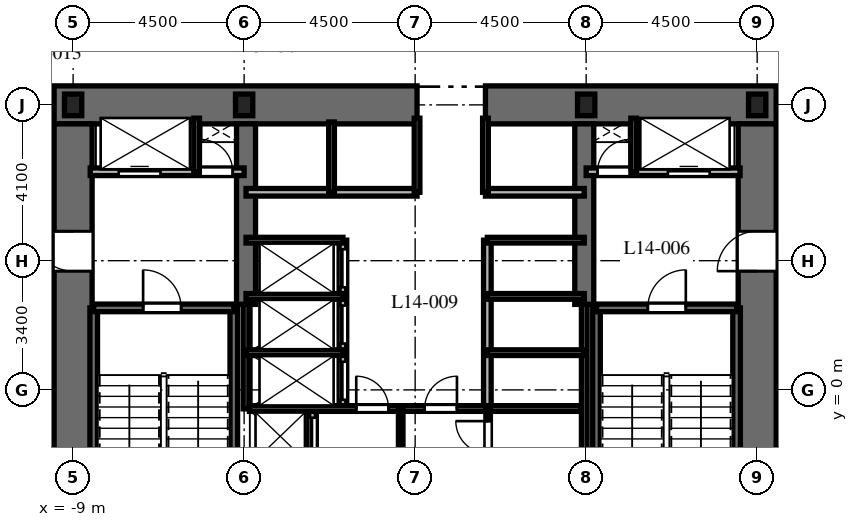
"""IFC4 building model, lengths in metres.
Left out: names, types, materials, properties, quantities, classifications, styles, units other than length and angle.
Written with IfcOpenShell. Run it as: python <this file> out.ifc"""

import sys

from ifc_helpers import new_model, si_unit, direction, frame, frame_2d, origin, origin_2d, place, context, subcontext, project, spatial, rectangle, i_section, extrude, element, fill, save


model = new_model("IFC4")
c1 = context("Model", 3, precision=1e-05, world=origin(), true_north=direction((0.0, 1.0)))
c2 = subcontext(c1, "Body", "Model", "MODEL_VIEW")
j1 = project(units=[si_unit("LENGTHUNIT", "METRE"), si_unit("PLANEANGLEUNIT", "RADIAN")], contexts=[c1])
p1 = place(None, origin())
s1 = spatial("IfcSite", under=j1, at=p1, CompositionType="ELEMENT")
p2 = place(p1, origin())
s2 = spatial("IfcBuilding", under=s1, at=p2, CompositionType="ELEMENT")
p3 = place(p2, frame((0.0, 0.0, 63.8)))
s3 = spatial("IfcBuildingStorey", under=s2, at=p3, CompositionType="ELEMENT", Elevation=63.8)
p4 = place(p3, frame((-9.5, 7.5, 0.0), z_axis=(0.0, 0.0, 1.0), x_axis=(1.0, 0.0, 0.0)))
e1 = element("IfcWall", 1, at=p4, inside=s3, PredefinedType="SHEAR", context=c2, shape_type="SweptSolid", body=[
    extrude(rectangle(XDim=9.55, YDim=1.0, at=frame_2d((4.775, 0.0))), origin(), (0.0, 0.0, 1.0), 3.7),
])
p5 = place(p3, frame((1.85, 7.5, 0.0), z_axis=(0.0, 0.0, 1.0), x_axis=(1.0, 0.0, 0.0)))
e2 = element("IfcWall", 2, at=p5, inside=s3, PredefinedType="SHEAR", context=c2, shape_type="SweptSolid", body=[
    extrude(rectangle(XDim=7.65, YDim=1.0, at=frame_2d((3.825, 0.0))), origin(), (0.0, 0.0, 1.0), 3.7),
])
p6 = place(p3, frame((-9.0, -7.0, 0.0), z_axis=(0.0, 0.0, 1.0), x_axis=(0.0, 1.0, 0.0)))
e3 = element("IfcWall", 3, at=p6, inside=s3, PredefinedType="SHEAR", context=c2, shape_type="SweptSolid", body=[
    extrude(rectangle(XDim=14.0, YDim=1.0, at=frame_2d((7.0, 0.0))), origin(), (0.0, 0.0, 1.0), 3.7),
])
p7 = place(p6, frame((10.125, 0.0, 0.0)))
e4 = element("IfcOpeningElement", 4, at=p7, cuts=e3, PredefinedType="OPENING", context=c2, shape_type="SweptSolid", body=[
    extrude(rectangle(XDim=1.05, YDim=2.15, at=frame_2d((0.525, 1.075))), frame((0.0, 0.51, 0.0), z_axis=(0.0, -1.0, 0.0), x_axis=(1.0, 0.0, 0.0)), (0.0, 0.0, 1.0), 1.02),
])
p8 = place(p3, frame((9.0, -7.0, 0.0), z_axis=(0.0, 0.0, 1.0), x_axis=(0.0, 1.0, 0.0)))
e5 = element("IfcWall", 5, at=p8, inside=s3, PredefinedType="SHEAR", context=c2, shape_type="SweptSolid", body=[
    extrude(rectangle(XDim=14.0, YDim=1.0, at=frame_2d((7.0, 0.0))), origin(), (0.0, 0.0, 1.0), 3.7),
])
p9 = place(p8, frame((10.125, 0.0, 0.0)))
e6 = element("IfcOpeningElement", 6, at=p9, cuts=e5, PredefinedType="OPENING", context=c2, shape_type="SweptSolid", body=[
    extrude(rectangle(XDim=1.05, YDim=2.15, at=frame_2d((0.525, 1.075))), frame((0.0, 0.51, 0.0), z_axis=(0.0, -1.0, 0.0), x_axis=(1.0, 0.0, 0.0)), (0.0, 0.0, 1.0), 1.02),
])
for number, where, z_axis, x_axis in (
    (7, (-4.45, 2.25, 0.0), (0.0, 0.0, 1.0), (0.0, 1.0, 0.0)),
    (8, (4.45, 2.25, 0.0), (0.0, 0.0, 1.0), (0.0, 1.0, 0.0)),
):
    element("IfcWall", number, at=place(p3, frame(where, z_axis=z_axis, x_axis=x_axis)), inside=s3, PredefinedType="SHEAR", context=c2, shape_type="SweptSolid", body=[
        extrude(rectangle(XDim=4.75, YDim=0.5, at=frame_2d((2.375, 0.0))), origin(), (0.0, 0.0, 1.0), 3.7),
    ])
for number, where, z_axis, x_axis in (
    (9, (-8.458, -6.985, 0.0), (0.0, 0.0, 1.0), (0.0, 1.0, 0.0)),
    (10, (-4.772, -6.985, 0.0), (0.0, 0.0, 1.0), (0.0, 1.0, 0.0)),
):
    element("IfcWall", number, at=place(p3, frame(where, z_axis=z_axis, x_axis=x_axis)), inside=s3, PredefinedType="SHEAR", context=c2, shape_type="SweptSolid", body=[
        extrude(rectangle(XDim=9.143, YDim=0.2, at=frame_2d((4.572, 0.0))), origin(), (0.0, 0.0, 1.0), 3.7),
    ])
p10 = place(p3, frame((-8.458, 2.158, 0.0), z_axis=(0.0, 0.0, 1.0), x_axis=(1.0, 0.0, 0.0)))
e11 = element("IfcWall", 11, at=p10, inside=s3, PredefinedType="SHEAR", context=c2, shape_type="SweptSolid", body=[
    extrude(rectangle(XDim=3.686, YDim=0.2, at=frame_2d((1.843, 0.0))), origin(), (0.0, 0.0, 1.0), 3.7),
])
p11 = place(p10, frame((1.3, 0.0, 0.0)))
e12 = element("IfcOpeningElement", 12, at=p11, cuts=e11, PredefinedType="OPENING", context=c2, shape_type="SweptSolid", body=[
    extrude(rectangle(XDim=1.0, YDim=2.15, at=frame_2d((0.5, 1.075))), frame((0.0, 0.11, 0.0), z_axis=(0.0, -1.0, 0.0), x_axis=(1.0, 0.0, 0.0)), (0.0, 0.0, 1.0), 0.22),
])
for number, where, z_axis, x_axis in (
    (13, (4.772, -6.985, 0.0), (0.0, 0.0, 1.0), (0.0, 1.0, 0.0)),
    (14, (8.458, -6.985, 0.0), (0.0, 0.0, 1.0), (0.0, 1.0, 0.0)),
):
    element("IfcWall", number, at=place(p3, frame(where, z_axis=z_axis, x_axis=x_axis)), inside=s3, PredefinedType="SHEAR", context=c2, shape_type="SweptSolid", body=[
        extrude(rectangle(XDim=9.143, YDim=0.2, at=frame_2d((4.572, 0.0))), origin(), (0.0, 0.0, 1.0), 3.7),
    ])
p12 = place(p3, frame((4.772, 2.158, 0.0), z_axis=(0.0, 0.0, 1.0), x_axis=(1.0, 0.0, 0.0)))
e15 = element("IfcWall", 15, at=p12, inside=s3, PredefinedType="SHEAR", context=c2, shape_type="SweptSolid", body=[
    extrude(rectangle(XDim=3.686, YDim=0.2, at=frame_2d((1.843, 0.0))), origin(), (0.0, 0.0, 1.0), 3.7),
])
p13 = place(p12, frame((1.35, 0.0, 0.0)))
e16 = element("IfcOpeningElement", 16, at=p13, cuts=e15, PredefinedType="OPENING", context=c2, shape_type="SweptSolid", body=[
    extrude(rectangle(XDim=1.0, YDim=2.15, at=frame_2d((0.5, 1.075))), frame((0.0, 0.11, 0.0), z_axis=(0.0, -1.0, 0.0), x_axis=(1.0, 0.0, 0.0)), (0.0, 0.0, 1.0), 0.22),
])
for number, where, z_axis, x_axis in (
    (17, (9.0, 7.5, 0.0), (0.0, 0.0, 1.0), (1.0, 0.0, 0.0)),
    (18, (4.5, 7.5, 0.0), (0.0, 0.0, 1.0), (1.0, 0.0, 0.0)),
    (19, (-4.5, 7.5, 0.0), (0.0, 0.0, 1.0), (1.0, 0.0, 0.0)),
    (20, (-9.0, 7.5, 0.0), (0.0, 0.0, 1.0), (1.0, 0.0, 0.0)),
):
    element("IfcColumn", number, at=place(p3, frame(where, z_axis=z_axis, x_axis=x_axis)), inside=s3, PredefinedType="COLUMN", context=c2, shape_type="SweptSolid", body=[
        extrude(i_section(OverallWidth=0.454, OverallDepth=0.569, WebThickness=0.078, FlangeThickness=0.125, at=origin_2d()), origin(), (0.0, 0.0, 1.0), 3.7),
    ])
p14 = place(p3, frame((-8.55, 5.74, 0.0), z_axis=(0.0, 0.0, 1.0), x_axis=(1.0, 0.0, 0.0)))
e21 = element("IfcWall", 21, at=p14, inside=s3, PredefinedType="PARTITIONING", context=c2, shape_type="SweptSolid", body=[
    extrude(rectangle(XDim=4.05, YDim=0.2, at=frame_2d((2.025, 0.0))), origin(), (0.0, 0.0, 1.0), 3.4),
])
p15 = place(p14, frame((0.75, 0.0, 0.0)))
e22 = element("IfcOpeningElement", 22, at=p15, cuts=e21, PredefinedType="OPENING", context=c2, shape_type="SweptSolid", body=[
    extrude(rectangle(XDim=1.1, YDim=2.2, at=frame_2d((0.55, 1.1))), frame((0.0, 0.11, 0.0), z_axis=(0.0, -1.0, 0.0), x_axis=(1.0, 0.0, 0.0)), (0.0, 0.0, 1.0), 0.22),
])
p16 = place(p14, frame((2.9, 0.0, 0.0)))
e23 = element("IfcOpeningElement", 23, at=p16, cuts=e21, PredefinedType="OPENING", context=c2, shape_type="SweptSolid", body=[
    extrude(rectangle(XDim=0.85, YDim=2.03, at=frame_2d((0.425, 1.015))), frame((0.0, 0.11, 0.0), z_axis=(0.0, -1.0, 0.0), x_axis=(1.0, 0.0, 0.0)), (0.0, 0.0, 1.0), 0.22),
])
p17 = place(p3, frame((-5.75, 5.74, 0.0), z_axis=(0.0, 0.0, 1.0), x_axis=(0.0, 1.0, 0.0)))
e24 = element("IfcWall", 24, at=p17, inside=s3, PredefinedType="PARTITIONING", context=c2, shape_type="SweptSolid", body=[
    extrude(rectangle(XDim=1.41, YDim=0.15, at=frame_2d((0.705, 0.0))), origin(), (0.0, 0.0, 1.0), 3.4),
])
p18 = place(p3, frame((4.5, 5.74, 0.0), z_axis=(0.0, 0.0, 1.0), x_axis=(1.0, 0.0, 0.0)))
e25 = element("IfcWall", 25, at=p18, inside=s3, PredefinedType="PARTITIONING", context=c2, shape_type="SweptSolid", body=[
    extrude(rectangle(XDim=4.05, YDim=0.2, at=frame_2d((2.025, 0.0))), origin(), (0.0, 0.0, 1.0), 3.4),
])
p19 = place(p18, frame((0.3, 0.0, 0.0)))
e26 = element("IfcOpeningElement", 26, at=p19, cuts=e25, PredefinedType="OPENING", context=c2, shape_type="SweptSolid", body=[
    extrude(rectangle(XDim=0.85, YDim=2.03, at=frame_2d((0.425, 1.015))), frame((0.0, 0.11, 0.0), z_axis=(0.0, -1.0, 0.0), x_axis=(1.0, 0.0, 0.0)), (0.0, 0.0, 1.0), 0.22),
])
p20 = place(p18, frame((2.15, 0.0, 0.0)))
e27 = element("IfcOpeningElement", 27, at=p20, cuts=e25, PredefinedType="OPENING", context=c2, shape_type="SweptSolid", body=[
    extrude(rectangle(XDim=1.1, YDim=2.2, at=frame_2d((0.55, 1.1))), frame((0.0, 0.11, 0.0), z_axis=(0.0, -1.0, 0.0), x_axis=(1.0, 0.0, 0.0)), (0.0, 0.0, 1.0), 0.22),
])
p21 = place(p3, frame((5.75, 5.74, 0.0), z_axis=(0.0, 0.0, 1.0), x_axis=(0.0, 1.0, 0.0)))
e28 = element("IfcWall", 28, at=p21, inside=s3, PredefinedType="PARTITIONING", context=c2, shape_type="SweptSolid", body=[
    extrude(rectangle(XDim=1.41, YDim=0.15, at=frame_2d((0.705, 0.0))), origin(), (0.0, 0.0, 1.0), 3.4),
])
p22 = place(p3, frame((-2.7, -1.972, 0.0), z_axis=(0.0, 0.0, 1.0), x_axis=(0.0, 1.0, 0.0)))
e29 = element("IfcWall", 29, at=p22, inside=s3, PredefinedType="PARTITIONING", context=c2, shape_type="SweptSolid", body=[
    extrude(rectangle(XDim=1.472, YDim=0.2, at=frame_2d((0.736, 0.0))), origin(), (0.0, 0.0, 1.0), 3.4),
])
p23 = place(p22, frame((0.24, 0.0, 0.0)))
e30 = element("IfcOpeningElement", 30, at=p23, cuts=e29, PredefinedType="OPENING", context=c2, shape_type="SweptSolid", body=[
    extrude(rectangle(XDim=1.0, YDim=2.2, at=frame_2d((0.5, 1.1))), frame((0.0, 0.11, 0.0), z_axis=(0.0, -1.0, 0.0), x_axis=(1.0, 0.0, 0.0)), (0.0, 0.0, 1.0), 0.22),
])
p24 = place(p3, frame((-4.45, 5.2, 0.0), z_axis=(0.0, 0.0, 1.0), x_axis=(1.0, 0.0, 0.0)))
e31 = element("IfcWall", 31, at=p24, inside=s3, PredefinedType="PARTITIONING", context=c2, shape_type="SweptSolid", body=[
    extrude(rectangle(XDim=4.5, YDim=0.2, at=frame_2d((2.25, 0.0))), origin(), (0.0, 0.0, 1.0), 3.4),
])
p25 = place(p3, frame((1.85, 5.2, 0.0), z_axis=(0.0, 0.0, 1.0), x_axis=(1.0, 0.0, 0.0)))
e32 = element("IfcWall", 32, at=p25, inside=s3, PredefinedType="PARTITIONING", context=c2, shape_type="SweptSolid", body=[
    extrude(rectangle(XDim=2.6, YDim=0.2, at=frame_2d((1.3, 0.0))), origin(), (0.0, 0.0, 1.0), 3.4),
])
p26 = place(p3, frame((-2.2, 5.2, 0.0), z_axis=(0.0, 0.0, 1.0), x_axis=(0.0, 1.0, 0.0)))
e33 = element("IfcWall", 33, at=p26, inside=s3, PredefinedType="PARTITIONING", context=c2, shape_type="SweptSolid", body=[
    extrude(rectangle(XDim=1.85, YDim=0.15, at=frame_2d((0.925, 0.0))), origin(), (0.0, 0.0, 1.0), 3.4),
])
for number, where, z_axis, x_axis in (
    (34, (0.05, 5.2, 0.0), (0.0, 0.0, 1.0), (0.0, 1.0, 0.0)),
    (35, (1.85, 5.2, 0.0), (0.0, 0.0, 1.0), (0.0, 1.0, 0.0)),
):
    element("IfcWall", number, at=place(p3, frame(where, z_axis=z_axis, x_axis=x_axis)), inside=s3, PredefinedType="PARTITIONING", context=c2, shape_type="SweptSolid", body=[
        extrude(rectangle(XDim=1.95, YDim=0.15, at=frame_2d((0.975, 0.0))), origin(), (0.0, 0.0, 1.0), 3.4),
    ])
p27 = place(p3, frame((-4.45, -0.5, 0.0), z_axis=(0.0, 0.0, 1.0), x_axis=(0.0, 1.0, 0.0)))
e36 = element("IfcWall", 36, at=p27, inside=s3, PredefinedType="PARTITIONING", context=c2, shape_type="SweptSolid", body=[
    extrude(rectangle(XDim=2.75, YDim=0.15, at=frame_2d((1.375, 0.0))), origin(), (0.0, 0.0, 1.0), 3.4),
])
p28 = place(p3, frame((4.45, -1.972, 0.0), z_axis=(0.0, 0.0, 1.0), x_axis=(0.0, 1.0, 0.0)))
e37 = element("IfcWall", 37, at=p28, inside=s3, PredefinedType="PARTITIONING", context=c2, shape_type="SweptSolid", body=[
    extrude(rectangle(XDim=4.222, YDim=0.15, at=frame_2d((2.111, 0.0))), origin(), (0.0, 0.0, 1.0), 3.4),
])
p29 = place(p3, frame((-1.9, -0.5, 0.0), z_axis=(0.0, 0.0, 1.0), x_axis=(0.0, 1.0, 0.0)))
e38 = element("IfcWall", 38, at=p29, inside=s3, PredefinedType="PARTITIONING", context=c2, shape_type="SweptSolid", body=[
    extrude(rectangle(XDim=4.44, YDim=0.2, at=frame_2d((2.22, 0.0))), origin(), (0.0, 0.0, 1.0), 3.4),
])
p30 = place(p29, frame((0.24, 0.0, 0.0)))
e39 = element("IfcOpeningElement", 39, at=p30, cuts=e38, PredefinedType="OPENING", context=c2, shape_type="SweptSolid", body=[
    extrude(rectangle(XDim=1.0, YDim=2.2, at=frame_2d((0.5, 1.1))), frame((0.0, 0.11, 0.0), z_axis=(0.0, -1.0, 0.0), x_axis=(1.0, 0.0, 0.0)), (0.0, 0.0, 1.0), 0.22),
])
p31 = place(p29, frame((1.72, 0.0, 0.0)))
e40 = element("IfcOpeningElement", 40, at=p31, cuts=e38, PredefinedType="OPENING", context=c2, shape_type="SweptSolid", body=[
    extrude(rectangle(XDim=1.0, YDim=2.2, at=frame_2d((0.5, 1.1))), frame((0.0, 0.11, 0.0), z_axis=(0.0, -1.0, 0.0), x_axis=(1.0, 0.0, 0.0)), (0.0, 0.0, 1.0), 0.22),
])
p32 = place(p29, frame((3.2, 0.0, 0.0)))
e41 = element("IfcOpeningElement", 41, at=p32, cuts=e38, PredefinedType="OPENING", context=c2, shape_type="SweptSolid", body=[
    extrude(rectangle(XDim=1.0, YDim=2.2, at=frame_2d((0.5, 1.1))), frame((0.0, 0.11, 0.0), z_axis=(0.0, -1.0, 0.0), x_axis=(1.0, 0.0, 0.0)), (0.0, 0.0, 1.0), 0.22),
])
for number, where, z_axis, x_axis in (
    (42, (-4.45, 3.94, 0.0), (0.0, 0.0, 1.0), (1.0, 0.0, 0.0)),
    (43, (-4.45, 0.98, 0.0), (0.0, 0.0, 1.0), (1.0, 0.0, 0.0)),
    (44, (-4.45, 2.46, 0.0), (0.0, 0.0, 1.0), (1.0, 0.0, 0.0)),
):
    element("IfcWall", number, at=place(p3, frame(where, z_axis=z_axis, x_axis=x_axis)), inside=s3, PredefinedType="PARTITIONING", context=c2, shape_type="SweptSolid", body=[
        extrude(rectangle(XDim=2.55, YDim=0.15, at=frame_2d((1.275, 0.0))), origin(), (0.0, 0.0, 1.0), 3.4),
    ])
p33 = place(p3, frame((1.9, -0.5, 0.0), z_axis=(0.0, 0.0, 1.0), x_axis=(0.0, 1.0, 0.0)))
e45 = element("IfcWall", 45, at=p33, inside=s3, PredefinedType="PARTITIONING", context=c2, shape_type="SweptSolid", body=[
    extrude(rectangle(XDim=4.44, YDim=0.2, at=frame_2d((2.22, 0.0))), origin(), (0.0, 0.0, 1.0), 3.4),
])
for number, where, z_axis, x_axis in (
    (46, (1.9, 3.94, 0.0), (0.0, 0.0, 1.0), (1.0, 0.0, 0.0)),
    (47, (1.9, 0.98, 0.0), (0.0, 0.0, 1.0), (1.0, 0.0, 0.0)),
    (48, (1.9, 2.46, 0.0), (0.0, 0.0, 1.0), (1.0, 0.0, 0.0)),
):
    element("IfcWall", number, at=place(p3, frame(where, z_axis=z_axis, x_axis=x_axis)), inside=s3, PredefinedType="PARTITIONING", context=c2, shape_type="SweptSolid", body=[
        extrude(rectangle(XDim=2.55, YDim=0.15, at=frame_2d((1.275, 0.0))), origin(), (0.0, 0.0, 1.0), 3.4),
    ])
p34 = place(p3, frame((-4.36, -0.49, 0.0), z_axis=(0.0, 0.0, 1.0), x_axis=(1.0, 0.0, 0.0)))
e49 = element("IfcWall", 49, at=p34, inside=s3, PredefinedType="PARTITIONING", context=c2, shape_type="SweptSolid", body=[
    extrude(rectangle(XDim=8.72, YDim=0.15, at=frame_2d((4.36, 0.0))), origin(), (0.0, 0.0, 1.0), 3.4),
])
p35 = place(p34, frame((2.81, 0.0, 0.0)))
e50 = element("IfcOpeningElement", 50, at=p35, cuts=e49, PredefinedType="OPENING", context=c2, shape_type="SweptSolid", body=[
    extrude(rectangle(XDim=0.85, YDim=2.03, at=frame_2d((0.425, 1.015))), frame((0.0, 0.085, 0.0), z_axis=(0.0, -1.0, 0.0), x_axis=(1.0, 0.0, 0.0)), (0.0, 0.0, 1.0), 0.17),
])
p36 = place(p34, frame((4.61, 0.0, 0.0)))
e51 = element("IfcOpeningElement", 51, at=p36, cuts=e49, PredefinedType="OPENING", context=c2, shape_type="SweptSolid", body=[
    extrude(rectangle(XDim=0.85, YDim=2.03, at=frame_2d((0.425, 1.015))), frame((0.0, 0.085, 0.0), z_axis=(0.0, -1.0, 0.0), x_axis=(1.0, 0.0, 0.0)), (0.0, 0.0, 1.0), 0.17),
])
p37 = place(p3, frame((-0.38, -1.972, 0.0), z_axis=(0.0, 0.0, 1.0), x_axis=(0.0, 1.0, 0.0)))
e52 = element("IfcWall", 52, at=p37, inside=s3, PredefinedType="PARTITIONING", context=c2, shape_type="SweptSolid", body=[
    extrude(rectangle(XDim=1.472, YDim=0.12, at=frame_2d((0.736, 0.0))), origin(), (0.0, 0.0, 1.0), 3.4),
])
p38 = place(p3, frame((1.92, -1.972, 0.0), z_axis=(0.0, 0.0, 1.0), x_axis=(0.0, 1.0, 0.0)))
e53 = element("IfcWall", 53, at=p38, inside=s3, PredefinedType="PARTITIONING", context=c2, shape_type="SweptSolid", body=[
    extrude(rectangle(XDim=1.472, YDim=0.12, at=frame_2d((0.736, 0.0))), origin(), (0.0, 0.0, 1.0), 3.4),
])
p39 = place(p38, frame((0.3, 0.0, 0.0)))
e54 = element("IfcOpeningElement", 54, at=p39, cuts=e53, PredefinedType="OPENING", context=c2, shape_type="SweptSolid", body=[
    extrude(rectangle(XDim=0.85, YDim=2.03, at=frame_2d((0.425, 1.015))), frame((0.0, 0.07, 0.0), z_axis=(0.0, -1.0, 0.0), x_axis=(1.0, 0.0, 0.0)), (0.0, 0.0, 1.0), 0.14),
])
p40 = place(p11, origin())
e55 = element("IfcDoor", 55, at=p40, inside=s3, OperationType="SINGLE_SWING_LEFT", PredefinedType="DOOR", context=c2, shape_type="SweptSolid", body=[
    extrude(rectangle(XDim=1.0, YDim=2.15, at=frame_2d((0.5, 1.075))), frame((0.0, 0.025, 0.0), z_axis=(0.0, -1.0, 0.0), x_axis=(1.0, 0.0, 0.0)), (0.0, 0.0, 1.0), 0.05),
])
fill(e12, e55)
p41 = place(p13, origin())
e56 = element("IfcDoor", 56, at=p41, inside=s3, OperationType="SINGLE_SWING_RIGHT", PredefinedType="DOOR", context=c2, shape_type="SweptSolid", body=[
    extrude(rectangle(XDim=1.0, YDim=2.15, at=frame_2d((0.5, 1.075))), frame((0.0, 0.025, 0.0), z_axis=(0.0, -1.0, 0.0), x_axis=(1.0, 0.0, 0.0)), (0.0, 0.0, 1.0), 0.05),
])
fill(e16, e56)
p42 = place(p7, origin())
e57 = element("IfcDoor", 57, at=p42, inside=s3, OperationType="SINGLE_SWING_RIGHT", PredefinedType="DOOR", context=c2, shape_type="SweptSolid", body=[
    extrude(rectangle(XDim=1.05, YDim=2.15, at=frame_2d((0.525, 1.075))), frame((0.0, 0.025, 0.0), z_axis=(0.0, -1.0, 0.0), x_axis=(1.0, 0.0, 0.0)), (0.0, 0.0, 1.0), 0.05),
])
fill(e4, e57)
p43 = place(p9, origin())
e58 = element("IfcDoor", 58, at=p43, inside=s3, OperationType="SINGLE_SWING_LEFT", PredefinedType="DOOR", context=c2, shape_type="SweptSolid", body=[
    extrude(rectangle(XDim=1.05, YDim=2.15, at=frame_2d((0.525, 1.075))), frame((0.0, 0.025, 0.0), z_axis=(0.0, -1.0, 0.0), x_axis=(1.0, 0.0, 0.0)), (0.0, 0.0, 1.0), 0.05),
])
fill(e6, e58)
p44 = place(p15, origin())
e59 = element("IfcDoor", 59, at=p44, inside=s3, OperationType="SLIDING_TO_LEFT", PredefinedType="DOOR", context=c2, shape_type="SweptSolid", body=[
    extrude(rectangle(XDim=1.1, YDim=2.2, at=frame_2d((0.55, 1.1))), frame((0.0, 0.025, 0.0), z_axis=(0.0, -1.0, 0.0), x_axis=(1.0, 0.0, 0.0)), (0.0, 0.0, 1.0), 0.05),
])
fill(e22, e59)
p45 = place(p16, origin())
e60 = element("IfcDoor", 60, at=p45, inside=s3, OperationType="SINGLE_SWING_LEFT", PredefinedType="DOOR", context=c2, shape_type="SweptSolid", body=[
    extrude(rectangle(XDim=0.85, YDim=2.03, at=frame_2d((0.425, 1.015))), frame((0.0, 0.025, 0.0), z_axis=(0.0, -1.0, 0.0), x_axis=(1.0, 0.0, 0.0)), (0.0, 0.0, 1.0), 0.05),
])
fill(e23, e60)
p46 = place(p19, origin())
e61 = element("IfcDoor", 61, at=p46, inside=s3, OperationType="SINGLE_SWING_RIGHT", PredefinedType="DOOR", context=c2, shape_type="SweptSolid", body=[
    extrude(rectangle(XDim=0.85, YDim=2.03, at=frame_2d((0.425, 1.015))), frame((0.0, 0.025, 0.0), z_axis=(0.0, -1.0, 0.0), x_axis=(1.0, 0.0, 0.0)), (0.0, 0.0, 1.0), 0.05),
])
fill(e26, e61)
p47 = place(p20, origin())
e62 = element("IfcDoor", 62, at=p47, inside=s3, OperationType="SLIDING_TO_RIGHT", PredefinedType="DOOR", context=c2, shape_type="SweptSolid", body=[
    extrude(rectangle(XDim=1.1, YDim=2.2, at=frame_2d((0.55, 1.1))), frame((0.0, 0.025, 0.0), z_axis=(0.0, -1.0, 0.0), x_axis=(1.0, 0.0, 0.0)), (0.0, 0.0, 1.0), 0.05),
])
fill(e27, e62)
p48 = place(p23, origin())
e63 = element("IfcDoor", 63, at=p48, inside=s3, OperationType="SLIDING_TO_LEFT", PredefinedType="DOOR", context=c2, shape_type="SweptSolid", body=[
    extrude(rectangle(XDim=1.0, YDim=2.2, at=frame_2d((0.5, 1.1))), frame((0.0, 0.025, 0.0), z_axis=(0.0, -1.0, 0.0), x_axis=(1.0, 0.0, 0.0)), (0.0, 0.0, 1.0), 0.05),
])
fill(e30, e63)
p49 = place(p30, origin())
e64 = element("IfcDoor", 64, at=p49, inside=s3, OperationType="SLIDING_TO_LEFT", PredefinedType="DOOR", context=c2, shape_type="SweptSolid", body=[
    extrude(rectangle(XDim=1.0, YDim=2.2, at=frame_2d((0.5, 1.1))), frame((0.0, 0.025, 0.0), z_axis=(0.0, -1.0, 0.0), x_axis=(1.0, 0.0, 0.0)), (0.0, 0.0, 1.0), 0.05),
])
fill(e39, e64)
p50 = place(p31, origin())
e65 = element("IfcDoor", 65, at=p50, inside=s3, OperationType="SLIDING_TO_LEFT", PredefinedType="DOOR", context=c2, shape_type="SweptSolid", body=[
    extrude(rectangle(XDim=1.0, YDim=2.2, at=frame_2d((0.5, 1.1))), frame((0.0, 0.025, 0.0), z_axis=(0.0, -1.0, 0.0), x_axis=(1.0, 0.0, 0.0)), (0.0, 0.0, 1.0), 0.05),
])
fill(e40, e65)
p51 = place(p32, origin())
e66 = element("IfcDoor", 66, at=p51, inside=s3, OperationType="SLIDING_TO_LEFT", PredefinedType="DOOR", context=c2, shape_type="SweptSolid", body=[
    extrude(rectangle(XDim=1.0, YDim=2.2, at=frame_2d((0.5, 1.1))), frame((0.0, 0.025, 0.0), z_axis=(0.0, -1.0, 0.0), x_axis=(1.0, 0.0, 0.0)), (0.0, 0.0, 1.0), 0.05),
])
fill(e41, e66)
p52 = place(p35, origin())
e67 = element("IfcDoor", 67, at=p52, inside=s3, OperationType="SINGLE_SWING_LEFT", PredefinedType="DOOR", context=c2, shape_type="SweptSolid", body=[
    extrude(rectangle(XDim=0.85, YDim=2.03, at=frame_2d((0.425, 1.015))), frame((0.0, 0.025, 0.0), z_axis=(0.0, -1.0, 0.0), x_axis=(1.0, 0.0, 0.0)), (0.0, 0.0, 1.0), 0.05),
])
fill(e50, e67)
p53 = place(p36, origin())
e68 = element("IfcDoor", 68, at=p53, inside=s3, OperationType="SINGLE_SWING_RIGHT", PredefinedType="DOOR", context=c2, shape_type="SweptSolid", body=[
    extrude(rectangle(XDim=0.85, YDim=2.03, at=frame_2d((0.425, 1.015))), frame((0.0, 0.025, 0.0), z_axis=(0.0, -1.0, 0.0), x_axis=(1.0, 0.0, 0.0)), (0.0, 0.0, 1.0), 0.05),
])
fill(e51, e68)
p54 = place(p39, origin())
e69 = element("IfcDoor", 69, at=p54, inside=s3, OperationType="SINGLE_SWING_RIGHT", PredefinedType="DOOR", context=c2, shape_type="SweptSolid", body=[
    extrude(rectangle(XDim=0.85, YDim=2.03, at=frame_2d((0.425, 1.015))), frame((0.0, 0.025, 0.0), z_axis=(0.0, -1.0, 0.0), x_axis=(1.0, 0.0, 0.0)), (0.0, 0.0, 1.0), 0.05),
])
fill(e54, e69)
save(model, sys.argv[1])
